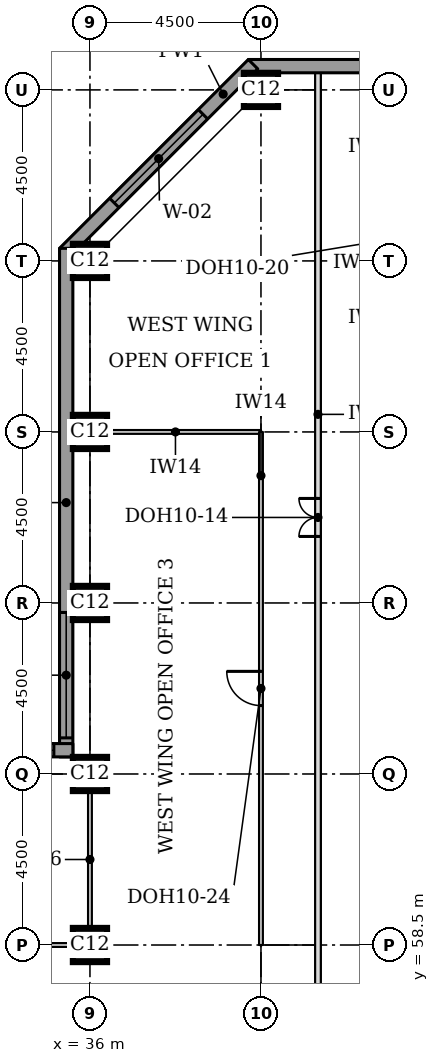
"""IFC4 building model, lengths in metres.
Left out: names, types, materials, properties, quantities, classifications, styles, units other than length and angle.
Written with IfcOpenShell. Run it as: python <this file> out.ifc"""

import sys

from ifc_helpers import new_model, si_unit, direction, frame, frame_2d, origin, origin_2d, place, context, subcontext, project, spatial, rectangle, extrude, element, fill, save


model = new_model("IFC4")
c1 = context("Model", 3, precision=1e-05, world=origin(), true_north=direction((0.0, 1.0)))
c2 = subcontext(c1, "Body", "Model", "MODEL_VIEW")
j1 = project(units=[si_unit("LENGTHUNIT", "METRE"), si_unit("PLANEANGLEUNIT", "RADIAN")], contexts=[c1])
p1 = place(None, origin())
s1 = spatial("IfcSite", under=j1, at=p1, CompositionType="ELEMENT")
p2 = place(p1, origin())
s2 = spatial("IfcBuilding", under=s1, at=p2, CompositionType="ELEMENT")
p3 = place(p2, frame((0.0, 0.0, 223.0)))
s3 = spatial("IfcBuildingStorey", under=s2, at=p3, CompositionType="ELEMENT", Elevation=223.0)
for number, where, z_axis, x_axis in (
    (1, (36.0, 58.5, 0.0), (0.0, 0.0, 1.0), (1.0, 0.0, 0.0)),
    (2, (36.0, 63.0, 0.0), (0.0, 0.0, 1.0), (1.0, 0.0, 0.0)),
    (3, (36.0, 67.5, 0.0), (0.0, 0.0, 1.0), (1.0, 0.0, 0.0)),
    (4, (36.0, 72.0, 0.0), (0.0, 0.0, 1.0), (1.0, 0.0, 0.0)),
    (5, (36.0, 76.5, 0.0), (0.0, 0.0, 1.0), (1.0, 0.0, 0.0)),
    (6, (40.5, 81.0, 0.0), (0.0, 0.0, 1.0), (1.0, 0.0, 0.0)),
):
    element("IfcColumn", number, at=place(p3, frame(where, z_axis=z_axis, x_axis=x_axis)), inside=s3, PredefinedType="COLUMN", context=c2, shape_type="SweptSolid", body=[
        extrude(rectangle(XDim=0.9, YDim=0.9, at=origin_2d()), origin(), (0.0, 0.0, 1.0), 3.7),
    ])
p4 = place(p3, frame((72.331, 81.625, 0.0), z_axis=(0.0, 0.0, 1.0), x_axis=(-1.0, 0.0, 0.0)))
e7 = element("IfcWall", 7, at=p4, inside=s3, PredefinedType="STANDARD", context=c2, shape_type="SweptSolid", body=[
    extrude(rectangle(XDim=32.163, YDim=0.35, at=frame_2d((16.081, 0.0))), origin(), (0.0, 0.0, 1.0), 3.525),
])
p5 = place(p4, frame((5.431, 0.0, 0.9)))
e8 = element("IfcOpeningElement", 8, at=p5, cuts=e7, PredefinedType="OPENING", context=c2, shape_type="SweptSolid", body=[
    extrude(rectangle(XDim=3.3, YDim=1.9, at=frame_2d((1.65, 0.95))), frame((0.0, 0.185, 0.0), z_axis=(0.0, -1.0, 0.0), x_axis=(1.0, 0.0, 0.0)), (0.0, 0.0, 1.0), 0.37),
])
p6 = place(p4, frame((9.931, 0.0, 0.9)))
e9 = element("IfcOpeningElement", 9, at=p6, cuts=e7, PredefinedType="OPENING", context=c2, shape_type="SweptSolid", body=[
    extrude(rectangle(XDim=3.3, YDim=1.9, at=frame_2d((1.65, 0.95))), frame((0.0, 0.185, 0.0), z_axis=(0.0, -1.0, 0.0), x_axis=(1.0, 0.0, 0.0)), (0.0, 0.0, 1.0), 0.37),
])
p7 = place(p4, frame((14.431, 0.0, 0.9)))
e10 = element("IfcOpeningElement", 10, at=p7, cuts=e7, PredefinedType="OPENING", context=c2, shape_type="SweptSolid", body=[
    extrude(rectangle(XDim=3.3, YDim=1.9, at=frame_2d((1.65, 0.95))), frame((0.0, 0.185, 0.0), z_axis=(0.0, -1.0, 0.0), x_axis=(1.0, 0.0, 0.0)), (0.0, 0.0, 1.0), 0.37),
])
p8 = place(p4, frame((18.931, 0.0, 0.9)))
e11 = element("IfcOpeningElement", 11, at=p8, cuts=e7, PredefinedType="OPENING", context=c2, shape_type="SweptSolid", body=[
    extrude(rectangle(XDim=3.3, YDim=1.9, at=frame_2d((1.65, 0.95))), frame((0.0, 0.185, 0.0), z_axis=(0.0, -1.0, 0.0), x_axis=(1.0, 0.0, 0.0)), (0.0, 0.0, 1.0), 0.37),
])
p9 = place(p4, frame((23.431, 0.0, 0.9)))
e12 = element("IfcOpeningElement", 12, at=p9, cuts=e7, PredefinedType="OPENING", context=c2, shape_type="SweptSolid", body=[
    extrude(rectangle(XDim=3.3, YDim=1.9, at=frame_2d((1.65, 0.95))), frame((0.0, 0.185, 0.0), z_axis=(0.0, -1.0, 0.0), x_axis=(1.0, 0.0, 0.0)), (0.0, 0.0, 1.0), 0.37),
])
p10 = place(p3, frame((40.292, 81.676, 0.0), z_axis=(0.0, 0.0, 1.0), x_axis=(-0.707106781187, -0.707106781187, 0.0)))
e13 = element("IfcWall", 13, at=p10, inside=s3, PredefinedType="STANDARD", context=c2, shape_type="SweptSolid", body=[
    extrude(rectangle(XDim=7.027, YDim=0.35, at=frame_2d((3.513, 0.0))), origin(), (0.0, 0.0, 1.0), 3.525),
])
p11 = place(p10, frame((1.863, 0.0, 0.9)))
e14 = element("IfcOpeningElement", 14, at=p11, cuts=e13, PredefinedType="OPENING", context=c2, shape_type="SweptSolid", body=[
    extrude(rectangle(XDim=3.3, YDim=1.9, at=frame_2d((1.65, 0.95))), frame((0.0, 0.185, 0.0), z_axis=(0.0, -1.0, 0.0), x_axis=(1.0, 0.0, 0.0)), (0.0, 0.0, 1.0), 0.37),
])
p12 = place(p3, frame((35.375, 76.831, 0.0), z_axis=(0.0, 0.0, 1.0), x_axis=(0.0, -1.0, 0.0)))
e15 = element("IfcWall", 15, at=p12, inside=s3, PredefinedType="STANDARD", context=c2, shape_type="SweptSolid", body=[
    extrude(rectangle(XDim=13.381, YDim=0.35, at=frame_2d((6.691, 0.0))), origin(), (0.0, 0.0, 1.0), 3.525),
])
p13 = place(p12, frame((9.581, 0.0, 0.9)))
e16 = element("IfcOpeningElement", 16, at=p13, cuts=e15, PredefinedType="OPENING", context=c2, shape_type="SweptSolid", body=[
    extrude(rectangle(XDim=3.3, YDim=1.9, at=frame_2d((1.65, 0.95))), frame((0.0, 0.185, 0.0), z_axis=(0.0, -1.0, 0.0), x_axis=(1.0, 0.0, 0.0)), (0.0, 0.0, 1.0), 0.37),
])
p14 = place(p3, frame((35.55, 63.625, 0.0), z_axis=(0.0, 0.0, 1.0), x_axis=(-1.0, 0.0, 0.0)))
e17 = element("IfcWall", 17, at=p14, inside=s3, PredefinedType="STANDARD", context=c2, shape_type="SweptSolid", body=[
    extrude(rectangle(XDim=17.881, YDim=0.35, at=frame_2d((8.941, 0.0))), origin(), (0.0, 0.0, 1.0), 3.525),
])
p15 = place(p14, frame((0.5, 0.0, 0.9)))
e18 = element("IfcOpeningElement", 18, at=p15, cuts=e17, PredefinedType="OPENING", context=c2, shape_type="SweptSolid", body=[
    extrude(rectangle(XDim=3.3, YDim=1.9, at=frame_2d((1.65, 0.95))), frame((0.0, 0.185, 0.0), z_axis=(0.0, -1.0, 0.0), x_axis=(1.0, 0.0, 0.0)), (0.0, 0.0, 1.0), 0.37),
])
p16 = place(p14, frame((9.15, 0.0, 0.9)))
e19 = element("IfcOpeningElement", 19, at=p16, cuts=e17, PredefinedType="OPENING", context=c2, shape_type="SweptSolid", body=[
    extrude(rectangle(XDim=3.3, YDim=1.9, at=frame_2d((1.65, 0.95))), frame((0.0, 0.185, 0.0), z_axis=(0.0, -1.0, 0.0), x_axis=(1.0, 0.0, 0.0)), (0.0, 0.0, 1.0), 0.37),
])
p17 = place(p3, frame((42.0, 57.075, 0.0), z_axis=(0.0, 0.0, 1.0), x_axis=(0.0, 1.0, 0.0)))
e20 = element("IfcWall", 20, at=p17, inside=s3, PredefinedType="PARTITIONING", context=c2, shape_type="SweptSolid", body=[
    extrude(rectangle(XDim=24.375, YDim=0.15, at=frame_2d((12.188, 0.0))), origin(), (0.0, 0.0, 1.0), 3.55),
])
p18 = place(p17, frame((12.175, 0.0, 0.0)))
e21 = element("IfcOpeningElement", 21, at=p18, cuts=e20, PredefinedType="OPENING", context=c2, shape_type="SweptSolid", body=[
    extrude(rectangle(XDim=1.0, YDim=2.1, at=frame_2d((0.5, 1.05))), frame((0.0, 0.085, 0.0), z_axis=(0.0, -1.0, 0.0), x_axis=(1.0, 0.0, 0.0)), (0.0, 0.0, 1.0), 0.17),
])
p19 = place(p3, frame((36.0, 72.0, 0.0), z_axis=(0.0, 0.0, 1.0), x_axis=(1.0, 0.0, 0.0)))
e22 = element("IfcWall", 22, at=p19, inside=s3, PredefinedType="PARTITIONING", context=c2, shape_type="SweptSolid", body=[
    extrude(rectangle(XDim=4.5, YDim=0.1, at=frame_2d((2.25, 0.0))), origin(), (0.0, 0.0, 1.0), 3.55),
])
p20 = place(p3, frame((40.5, 72.0, 0.0), z_axis=(0.0, 0.0, 1.0), x_axis=(0.0, -1.0, 0.0)))
e23 = element("IfcWall", 23, at=p20, inside=s3, PredefinedType="PARTITIONING", context=c2, shape_type="SweptSolid", body=[
    extrude(rectangle(XDim=13.5, YDim=0.1, at=frame_2d((6.75, 0.0))), origin(), (0.0, 0.0, 1.0), 3.55),
])
p21 = place(p20, frame((6.3, 0.0, 0.0)))
e24 = element("IfcOpeningElement", 24, at=p21, cuts=e23, PredefinedType="OPENING", context=c2, shape_type="SweptSolid", body=[
    extrude(rectangle(XDim=0.9, YDim=2.1, at=frame_2d((0.45, 1.05))), frame((0.0, 0.06, 0.0), z_axis=(0.0, -1.0, 0.0), x_axis=(1.0, 0.0, 0.0)), (0.0, 0.0, 1.0), 0.12),
])
p22 = place(p3, frame((36.0, 63.0, 0.0), z_axis=(0.0, 0.0, 1.0), x_axis=(0.0, -1.0, 0.0)))
e25 = element("IfcWall", 25, at=p22, inside=s3, PredefinedType="PARTITIONING", context=c2, shape_type="SweptSolid", body=[
    extrude(rectangle(XDim=4.5, YDim=0.1, at=frame_2d((2.25, 0.0))), origin(), (0.0, 0.0, 1.0), 2.8),
])
p23 = place(p3, frame((36.0, 58.5, 0.0), z_axis=(0.0, 0.0, 1.0), x_axis=(-1.0, 0.0, 0.0)))
e26 = element("IfcWall", 26, at=p23, inside=s3, PredefinedType="PARTITIONING", context=c2, shape_type="SweptSolid", body=[
    extrude(rectangle(XDim=9.0, YDim=0.1, at=frame_2d((4.5, 0.0))), origin(), (0.0, 0.0, 1.0), 2.55),
])
p24 = place(p23, frame((4.05, 0.0, 0.0)))
e27 = element("IfcOpeningElement", 27, at=p24, cuts=e26, PredefinedType="OPENING", context=c2, shape_type="SweptSolid", body=[
    extrude(rectangle(XDim=0.9, YDim=2.1, at=frame_2d((0.45, 1.05))), frame((0.0, 0.06, 0.0), z_axis=(0.0, -1.0, 0.0), x_axis=(1.0, 0.0, 0.0)), (0.0, 0.0, 1.0), 0.12),
])
p25 = place(p11, origin())
e28 = element("IfcWindow", 28, at=p25, inside=s3, PartitioningType="SINGLE_PANEL", PredefinedType="WINDOW", context=c2, shape_type="SweptSolid", body=[
    extrude(rectangle(XDim=3.3, YDim=1.9, at=frame_2d((1.65, 0.95))), frame((0.0, 0.085, 0.0), z_axis=(0.0, -1.0, 0.0), x_axis=(1.0, 0.0, 0.0)), (0.0, 0.0, 1.0), 0.06),
])
fill(e14, e28)
p26 = place(p13, origin())
e29 = element("IfcWindow", 29, at=p26, inside=s3, PartitioningType="SINGLE_PANEL", PredefinedType="WINDOW", context=c2, shape_type="SweptSolid", body=[
    extrude(rectangle(XDim=3.3, YDim=1.9, at=frame_2d((1.65, 0.95))), frame((0.0, 0.085, 0.0), z_axis=(0.0, -1.0, 0.0), x_axis=(1.0, 0.0, 0.0)), (0.0, 0.0, 1.0), 0.06),
])
fill(e16, e29)
p27 = place(p15, origin())
e30 = element("IfcWindow", 30, at=p27, inside=s3, PartitioningType="SINGLE_PANEL", PredefinedType="WINDOW", context=c2, shape_type="SweptSolid", body=[
    extrude(rectangle(XDim=3.3, YDim=1.9, at=frame_2d((1.65, 0.95))), frame((0.0, 0.085, 0.0), z_axis=(0.0, -1.0, 0.0), x_axis=(1.0, 0.0, 0.0)), (0.0, 0.0, 1.0), 0.06),
])
fill(e18, e30)
p28 = place(p18, origin())
e31 = element("IfcDoor", 31, at=p28, inside=s3, OperationType="DOUBLE_DOOR_SINGLE_SWING", PredefinedType="DOOR", context=c2, shape_type="SweptSolid", body=[
    extrude(rectangle(XDim=1.0, YDim=2.1, at=frame_2d((0.5, 1.05))), frame((0.0, 0.025, 0.0), z_axis=(0.0, -1.0, 0.0), x_axis=(1.0, 0.0, 0.0)), (0.0, 0.0, 1.0), 0.05),
])
fill(e21, e31)
p29 = place(p21, frame((0.9, 0.0, 0.0), z_axis=(0.0, 0.0, 1.0), x_axis=(-1.0, 0.0, 0.0)))
e32 = element("IfcDoor", 32, at=p29, inside=s3, OperationType="SINGLE_SWING_RIGHT", PredefinedType="DOOR", context=c2, shape_type="SweptSolid", body=[
    extrude(rectangle(XDim=0.9, YDim=2.1, at=frame_2d((0.45, 1.05))), frame((0.0, 0.025, 0.0), z_axis=(0.0, -1.0, 0.0), x_axis=(1.0, 0.0, 0.0)), (0.0, 0.0, 1.0), 0.05),
])
fill(e24, e32)
save(model, sys.argv[1])
